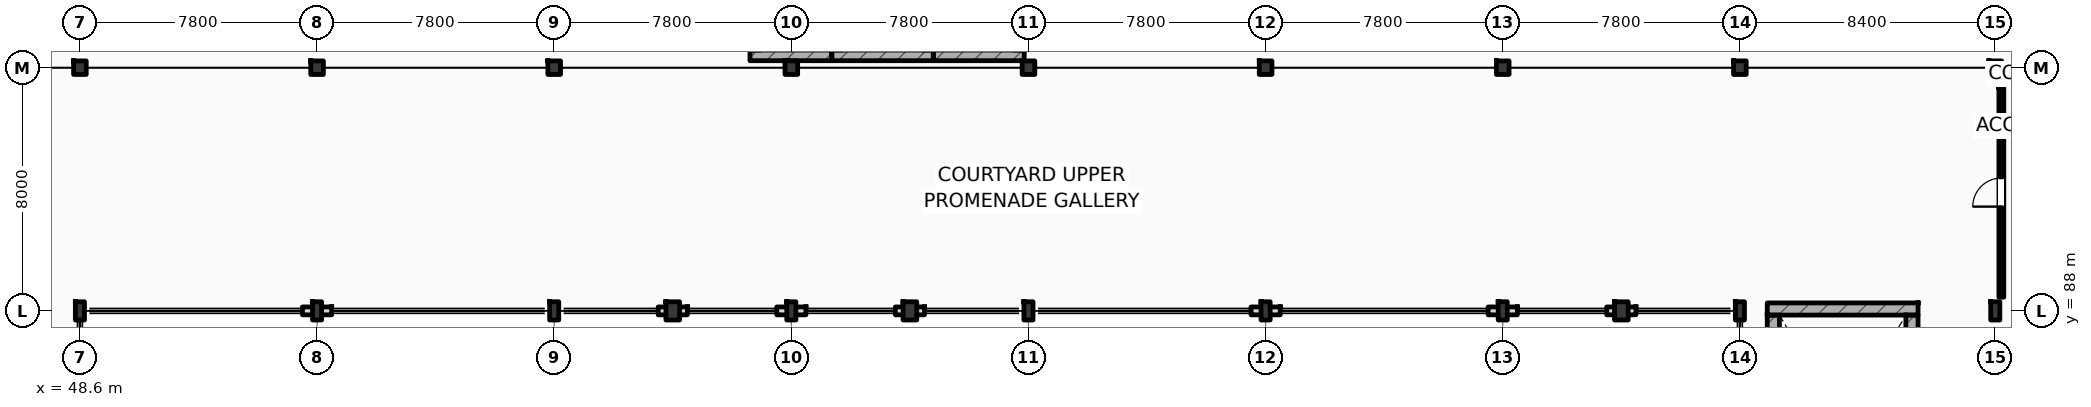
"""IFC4 building model, lengths in metres.
Left out: names, types, materials, properties, quantities, classifications, styles, units other than length and angle.
Written with IfcOpenShell. Run it as: python <this file> out.ifc"""

import sys

from ifc_helpers import new_model, si_unit, direction, frame, frame_2d, origin, origin_2d, place, context, subcontext, project, spatial, rectangle, i_section, extrude, element, fill, save


model = new_model("IFC4")
c1 = context("Model", 3, precision=1e-05, world=origin(), true_north=direction((0.0, 1.0)))
c2 = subcontext(c1, "Body", "Model", "MODEL_VIEW")
j1 = project(units=[si_unit("LENGTHUNIT", "METRE"), si_unit("PLANEANGLEUNIT", "RADIAN")], contexts=[c1])
p1 = place(None, origin())
s1 = spatial("IfcSite", under=j1, at=p1, CompositionType="ELEMENT")
p2 = place(p1, origin())
s2 = spatial("IfcBuilding", under=s1, at=p2, CompositionType="ELEMENT")
p3 = place(p2, frame((0.0, 0.0, 6.0)))
s3 = spatial("IfcBuildingStorey", under=s2, at=p3, CompositionType="ELEMENT", Elevation=6.0)
for number, where, z_axis, x_axis in (
    (1, (48.6, 96.0, 0.0), (0.0, 0.0, 1.0), (1.0, 0.0, 0.0)),
    (2, (56.4, 96.0, 0.0), (0.0, 0.0, 1.0), (1.0, 0.0, 0.0)),
    (3, (64.2, 96.0, 0.0), (0.0, 0.0, 1.0), (1.0, 0.0, 0.0)),
    (4, (72.0, 96.0, 0.0), (0.0, 0.0, 1.0), (1.0, 0.0, 0.0)),
    (5, (79.8, 96.0, 0.0), (0.0, 0.0, 1.0), (1.0, 0.0, 0.0)),
    (6, (87.6, 96.0, 0.0), (0.0, 0.0, 1.0), (1.0, 0.0, 0.0)),
    (7, (95.4, 96.0, 0.0), (0.0, 0.0, 1.0), (1.0, 0.0, 0.0)),
    (8, (103.2, 96.0, 0.0), (0.0, 0.0, 1.0), (1.0, 0.0, 0.0)),
    (9, (111.6, 96.0, 0.0), (0.0, 0.0, 1.0), (1.0, 0.0, 0.0)),
):
    element("IfcColumn", number, at=place(p3, frame(where, z_axis=z_axis, x_axis=x_axis)), inside=s3, PredefinedType="COLUMN", context=c2, shape_type="SweptSolid", body=[
        extrude(i_section(OverallWidth=0.416, OverallDepth=0.446, WebThickness=0.036, FlangeThickness=0.048, FilletRadius=0.015, at=origin_2d()), origin(), (0.0, 0.0, 1.0), 5.4),
    ])
for number, where, z_axis, x_axis in (
    (10, (48.6, 88.0, 0.0), (0.0, 0.0, 1.0), (1.0, 0.0, 0.0)),
    (11, (56.4, 88.0, 0.0), (0.0, 0.0, 1.0), (1.0, 0.0, 0.0)),
    (12, (64.2, 88.0, 0.0), (0.0, 0.0, 1.0), (1.0, 0.0, 0.0)),
    (13, (72.0, 88.0, 0.0), (0.0, 0.0, 1.0), (1.0, 0.0, 0.0)),
    (14, (79.8, 88.0, 0.0), (0.0, 0.0, 1.0), (1.0, 0.0, 0.0)),
    (15, (87.6, 88.0, 0.0), (0.0, 0.0, 1.0), (1.0, 0.0, 0.0)),
    (16, (95.4, 88.0, 0.0), (0.0, 0.0, 1.0), (1.0, 0.0, 0.0)),
    (17, (103.2, 88.0, 0.0), (0.0, 0.0, 1.0), (1.0, 0.0, 0.0)),
    (18, (111.6, 88.0, 0.0), (0.0, 0.0, 1.0), (1.0, 0.0, 0.0)),
):
    element("IfcColumn", number, at=place(p3, frame(where, z_axis=z_axis, x_axis=x_axis)), inside=s3, PredefinedType="COLUMN", context=c2, shape_type="SweptSolid", body=[
        extrude(i_section(OverallWidth=0.3, OverallDepth=0.6, WebThickness=0.015, FlangeThickness=0.03, FilletRadius=0.027, at=origin_2d()), origin(), (0.0, 0.0, 1.0), 5.4),
    ])
for number, where, z_axis, x_axis in (
    (19, (68.1, 88.0, 0.0), (0.0, 0.0, 1.0), (1.0, 0.0, 0.0)),
    (20, (75.9, 88.0, 0.0), (0.0, 0.0, 1.0), (1.0, 0.0, 0.0)),
    (21, (99.3, 88.0, 0.0), (0.0, 0.0, 1.0), (1.0, 0.0, 0.0)),
):
    element("IfcColumn", number, at=place(p3, frame(where, z_axis=z_axis, x_axis=x_axis)), inside=s3, PredefinedType="PILASTER", context=c2, shape_type="SweptSolid", body=[
        extrude(rectangle(XDim=0.45, YDim=0.6, at=origin_2d()), origin(), (0.0, 0.0, 1.0), 5.4),
    ])
p4 = place(p3, frame((104.1, 88.062, 0.0), z_axis=(0.0, 0.0, 1.0), x_axis=(1.0, 0.0, 0.0)))
e22 = element("IfcWall", 22, at=p4, inside=s3, PredefinedType="SHEAR", context=c2, shape_type="SweptSolid", body=[
    extrude(rectangle(XDim=4.96, YDim=0.4, at=frame_2d((2.48, 0.0))), origin(), (0.0, 0.0, 1.0), 5.4),
])
p5 = place(p3, frame((104.3, 78.75, 0.0), z_axis=(0.0, 0.0, 1.0), x_axis=(0.0, 1.0, 0.0)))
e23 = element("IfcWall", 23, at=p5, inside=s3, PredefinedType="SHEAR", context=c2, shape_type="SweptSolid", body=[
    extrude(rectangle(XDim=9.112, YDim=0.4, at=frame_2d((4.556, 0.0))), origin(), (0.0, 0.0, 1.0), 5.4),
])
p6 = place(p3, frame((108.86, 78.75, 0.0), z_axis=(0.0, 0.0, 1.0), x_axis=(0.0, 1.0, 0.0)))
e24 = element("IfcWall", 24, at=p6, inside=s3, PredefinedType="SHEAR", context=c2, shape_type="SweptSolid", body=[
    extrude(rectangle(XDim=9.112, YDim=0.4, at=frame_2d((4.556, 0.0))), origin(), (0.0, 0.0, 1.0), 5.4),
])
p7 = place(p6, frame((0.44, 0.0, 0.0)))
e25 = element("IfcOpeningElement", 25, at=p7, cuts=e24, PredefinedType="OPENING", context=c2, shape_type="SweptSolid", body=[
    extrude(rectangle(XDim=1.1, YDim=2.2, at=frame_2d((0.55, 1.1))), frame((0.0, 0.21, 0.0), z_axis=(0.0, -1.0, 0.0), x_axis=(1.0, 0.0, 0.0)), (0.0, 0.0, 1.0), 0.42),
])
for number, where, z_axis, x_axis in (
    (26, (55.92, 88.0, 0.0), (0.0, 0.0, 1.0), (1.0, 0.0, 0.0)),
    (27, (67.62, 88.0, 0.0), (0.0, 0.0, 1.0), (1.0, 0.0, 0.0)),
    (28, (71.52, 88.0, 0.0), (0.0, 0.0, 1.0), (1.0, 0.0, 0.0)),
    (29, (75.42, 88.0, 0.0), (0.0, 0.0, 1.0), (1.0, 0.0, 0.0)),
    (30, (87.12, 88.0, 0.0), (0.0, 0.0, 1.0), (1.0, 0.0, 0.0)),
    (31, (94.92, 88.0, 0.0), (0.0, 0.0, 1.0), (1.0, 0.0, 0.0)),
    (32, (98.82, 88.0, 0.0), (0.0, 0.0, 1.0), (1.0, 0.0, 0.0)),
):
    element("IfcWall", number, at=place(p3, frame(where, z_axis=z_axis, x_axis=x_axis)), inside=s3, PredefinedType="STANDARD", context=c2, shape_type="SweptSolid", body=[
        extrude(rectangle(XDim=0.96, YDim=0.26, at=frame_2d((0.48, 0.0))), origin(), (0.0, 0.0, 1.0), 4.54),
    ])
p8 = place(p3, frame((70.64, 96.405, 0.0), z_axis=(0.0, 0.0, 1.0), x_axis=(1.0, 0.0, 0.0)))
e33 = element("IfcWall", 33, at=p8, inside=s3, PredefinedType="SHEAR", context=c2, shape_type="SweptSolid", body=[
    extrude(rectangle(XDim=2.69, YDim=0.35, at=frame_2d((1.345, 0.0))), origin(), (0.0, 0.0, 1.0), 5.05),
])
p9 = place(p3, frame((73.33, 96.405, 0.0), z_axis=(0.0, 0.0, 1.0), x_axis=(1.0, 0.0, 0.0)))
e34 = element("IfcWall", 34, at=p9, inside=s3, PredefinedType="SHEAR", context=c2, shape_type="SweptSolid", body=[
    extrude(rectangle(XDim=3.34, YDim=0.35, at=frame_2d((1.67, 0.0))), origin(), (0.0, 0.0, 1.0), 5.05),
])
p10 = place(p3, frame((76.67, 96.405, 0.0), z_axis=(0.0, 0.0, 1.0), x_axis=(1.0, 0.0, 0.0)))
e35 = element("IfcWall", 35, at=p10, inside=s3, PredefinedType="SHEAR", context=c2, shape_type="SweptSolid", body=[
    extrude(rectangle(XDim=2.99, YDim=0.35, at=frame_2d((1.495, 0.0))), origin(), (0.0, 0.0, 1.0), 5.05),
])
p11 = place(p3, frame((111.8, 88.45, 0.0), z_axis=(0.0, 0.0, 1.0), x_axis=(0.0, 1.0, 0.0)))
e36 = element("IfcWall", 36, at=p11, inside=s3, PredefinedType="PARTITIONING", context=c2, shape_type="SweptSolid", body=[
    extrude(rectangle(XDim=6.9, YDim=0.16, at=frame_2d((3.45, 0.0))), origin(), (0.0, 0.0, 1.0), 4.59),
])
p12 = place(p11, frame((2.98, 0.0, 0.0)))
e37 = element("IfcOpeningElement", 37, at=p12, cuts=e36, PredefinedType="OPENING", context=c2, shape_type="SweptSolid", body=[
    extrude(rectangle(XDim=0.94, YDim=2.15, at=frame_2d((0.47, 1.075))), frame((0.0, 0.09, 0.0), z_axis=(0.0, -1.0, 0.0), x_axis=(1.0, 0.0, 0.0)), (0.0, 0.0, 1.0), 0.18),
])
p13 = place(p12, origin())
e38 = element("IfcDoor", 38, at=p13, inside=s3, OperationType="SINGLE_SWING_LEFT", PredefinedType="DOOR", context=c2, shape_type="SweptSolid", body=[
    extrude(rectangle(XDim=0.94, YDim=2.15, at=frame_2d((0.47, 1.075))), frame((0.0, 0.025, 0.0), z_axis=(0.0, -1.0, 0.0), x_axis=(1.0, 0.0, 0.0)), (0.0, 0.0, 1.0), 0.05),
])
fill(e37, e38)
save(model, sys.argv[1])
